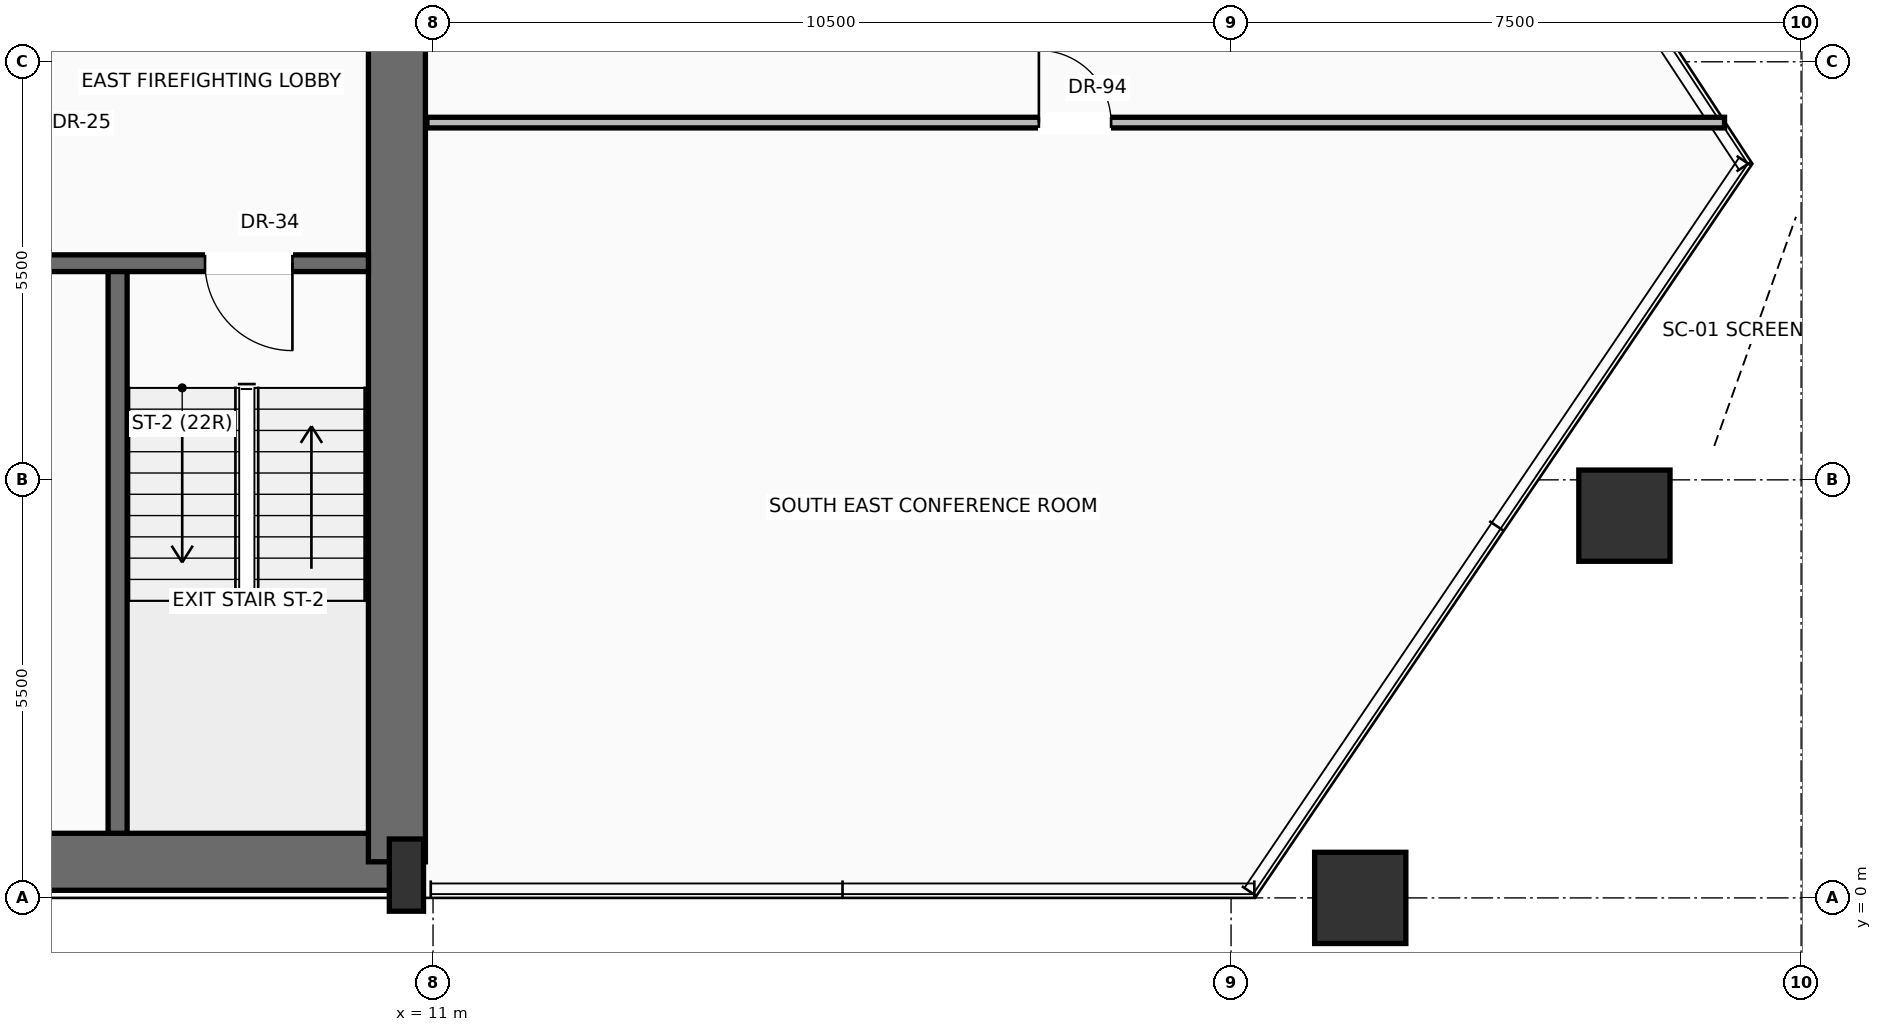
"""IFC4 building model, lengths in metres.
Left out: names, types, materials, properties, quantities, classifications, styles, units other than length and angle.
Written with IfcOpenShell. Run it as: python <this file> out.ifc"""

import sys

from ifc_helpers import new_model, si_unit, direction, frame, frame_2d, origin, origin_2d, place, context, subcontext, project, spatial, rectangle, hollow_rectangle, extrude, source, transform, mapped, element, fill, save


model = new_model("IFC4")
c1 = context("Model", 3, precision=1e-05, world=origin(), true_north=direction((0.0, 1.0)))
c2 = subcontext(c1, "Body", "Model", "MODEL_VIEW")
j1 = project(units=[si_unit("LENGTHUNIT", "METRE"), si_unit("PLANEANGLEUNIT", "RADIAN")], contexts=[c1])
p1 = place(None, origin())
s1 = spatial("IfcSite", under=j1, at=p1, CompositionType="ELEMENT")
p2 = place(p1, origin())
s2 = spatial("IfcBuilding", under=s1, at=p2, CompositionType="ELEMENT")
p3 = place(p2, frame((0.0, 0.0, 76.6)))
s3 = spatial("IfcBuildingStorey", under=s2, at=p3, CompositionType="ELEMENT", Elevation=76.6)
p4 = place(p3, frame((-10.65, 0.475, 0.0), z_axis=(0.0, 0.0, 1.0), x_axis=(1.0, 0.0, 0.0)))
e1 = element("IfcWall", 1, at=p4, inside=s3, PredefinedType="SHEAR", context=c2, shape_type="SweptSolid", body=[
    extrude(rectangle(XDim=21.3, YDim=0.75, at=frame_2d((10.65, 0.0))), origin(), (0.0, 0.0, 1.0), 3.45),
])
p5 = place(p3, frame((10.525, 0.475, 0.0), z_axis=(0.0, 0.0, 1.0), x_axis=(0.0, 1.0, 0.0)))
e2 = element("IfcWall", 2, at=p5, inside=s3, PredefinedType="SHEAR", context=c2, shape_type="SweptSolid", body=[
    extrude(rectangle(XDim=15.65, YDim=0.75, at=frame_2d((7.825, 0.0))), origin(), (0.0, 0.0, 1.0), 3.45),
])
m1 = source(origin(), c2, "Body", "SweptSolid", [
    extrude(rectangle(XDim=0.45, YDim=0.95, at=origin_2d()), origin(), (0.0, 0.0, 1.0), 3.7),
])
p6 = place(p3, frame((10.65, 0.3, 0.0), z_axis=(0.0, 0.0, 1.0), x_axis=(1.0, 0.0, 0.0)))
e3 = element("IfcColumn", 3, at=p6, inside=s3, PredefinedType="PILASTER", context=c2, shape_type="MappedRepresentation", body=[
    mapped(m1, transform((0.0, 0.0, 0.0), scale=1.0)),
])
m2 = source(origin(), c2, "Body", "SweptSolid", [
    extrude(hollow_rectangle(XDim=1.2, YDim=1.2, WallThickness=0.06, at=origin_2d()), origin(), (0.0, 0.0, 1.0), 3.691),
])
p7 = place(p3, frame((23.199, 0.0, 0.004), z_axis=(0.013425603818, 0.0, 0.99990987252), x_axis=(0.0, 1.0, 0.0)))
e4 = element("IfcColumn", 4, at=p7, inside=s3, PredefinedType="COLUMN", context=c2, shape_type="MappedRepresentation", body=[
    mapped(m2, transform((0.0, 0.0, 0.0), scale=1.0)),
])
m3 = source(origin(), c2, "Body", "SweptSolid", [
    extrude(hollow_rectangle(XDim=1.2, YDim=1.2, WallThickness=0.06, at=origin_2d()), origin(), (0.0, 0.0, 1.0), 3.692),
])
p8 = place(p3, frame((26.675, 5.029, 0.004), z_axis=(0.001190396523, -0.016268752486, 0.999866946473), x_axis=(0.997333723592, 0.072975638312, 0.0)))
e5 = element("IfcColumn", 5, at=p8, inside=s3, PredefinedType="COLUMN", context=c2, shape_type="MappedRepresentation", body=[
    mapped(m3, transform((0.0, 0.0, 0.0), scale=1.0)),
])
p9 = place(p3, frame((6.85, 0.85, 0.0), z_axis=(0.0, 0.0, 1.0), x_axis=(0.0, 1.0, 0.0)))
e6 = element("IfcWall", 6, at=p9, inside=s3, PredefinedType="SOLIDWALL", context=c2, shape_type="SweptSolid", body=[
    extrude(rectangle(XDim=7.5, YDim=0.25, at=frame_2d((3.75, 0.0))), origin(), (0.0, 0.0, 1.0), 3.45),
])
p10 = place(p3, frame((10.15, 8.35, 0.0), z_axis=(0.0, 0.0, 1.0), x_axis=(-1.0, 0.0, 0.0)))
e7 = element("IfcWall", 7, at=p10, inside=s3, PredefinedType="SOLIDWALL", context=c2, shape_type="SweptSolid", body=[
    extrude(rectangle(XDim=4.65, YDim=0.22, at=frame_2d((2.325, 0.0))), origin(), (0.0, 0.0, 1.0), 3.45),
])
p11 = place(p10, frame((1.0, 0.0, 0.0)))
e8 = element("IfcOpeningElement", 8, at=p11, cuts=e7, PredefinedType="OPENING", context=c2, shape_type="SweptSolid", body=[
    extrude(rectangle(XDim=1.15, YDim=2.2, at=frame_2d((0.575, 1.1))), frame((0.0, 0.12, 0.0), z_axis=(0.0, -1.0, 0.0), x_axis=(1.0, 0.0, 0.0)), (0.0, 0.0, 1.0), 0.24),
])
p12 = place(p3, frame((10.92, 10.2, 0.0), z_axis=(0.0, 0.0, 1.0), x_axis=(1.0, 0.0, 0.0)))
e9 = element("IfcWall", 9, at=p12, inside=s3, PredefinedType="PARTITIONING", context=c2, shape_type="SweptSolid", body=[
    extrude(rectangle(XDim=17.073, YDim=0.14, at=frame_2d((8.536, 0.0))), origin(), (0.0, 0.0, 1.0), 3.442),
])
p13 = place(p12, frame((8.051, 0.0, 0.0)))
e10 = element("IfcOpeningElement", 10, at=p13, cuts=e9, PredefinedType="OPENING", context=c2, shape_type="SweptSolid", body=[
    extrude(rectangle(XDim=0.95, YDim=2.2, at=frame_2d((0.475, 1.1))), frame((0.0, 0.08, 0.0), z_axis=(0.0, -1.0, 0.0), x_axis=(1.0, 0.0, 0.0)), (0.0, 0.0, 1.0), 0.16),
])
m4 = source(origin(), c2, "Body", "SweptSolid", [
    extrude(rectangle(XDim=1.15, YDim=2.2, at=frame_2d((0.575, 1.1))), frame((0.0, 0.025, 0.0), z_axis=(0.0, -1.0, 0.0), x_axis=(1.0, 0.0, 0.0)), (0.0, 0.0, 1.0), 0.05),
])
p14 = place(p11, origin())
e11 = element("IfcDoor", 11, at=p14, inside=s3, OperationType="SINGLE_SWING_LEFT", PredefinedType="DOOR", context=c2, shape_type="MappedRepresentation", body=[
    mapped(m4, transform((0.0, 0.0, 0.0), scale=1.0)),
])
fill(e8, e11)
m5 = source(origin(), c2, "Body", "SweptSolid", [
    extrude(rectangle(XDim=0.95, YDim=2.2, at=frame_2d((0.475, 1.1))), frame((0.0, 0.025, 0.0), z_axis=(0.0, -1.0, 0.0), x_axis=(1.0, 0.0, 0.0)), (0.0, 0.0, 1.0), 0.05),
])
p15 = place(p13, origin())
e12 = element("IfcDoor", 12, at=p15, inside=s3, OperationType="SINGLE_SWING_LEFT", PredefinedType="DOOR", context=c2, shape_type="MappedRepresentation", body=[
    mapped(m5, transform((0.0, 0.0, 0.0), scale=1.0)),
])
fill(e10, e12)
save(model, sys.argv[1])
